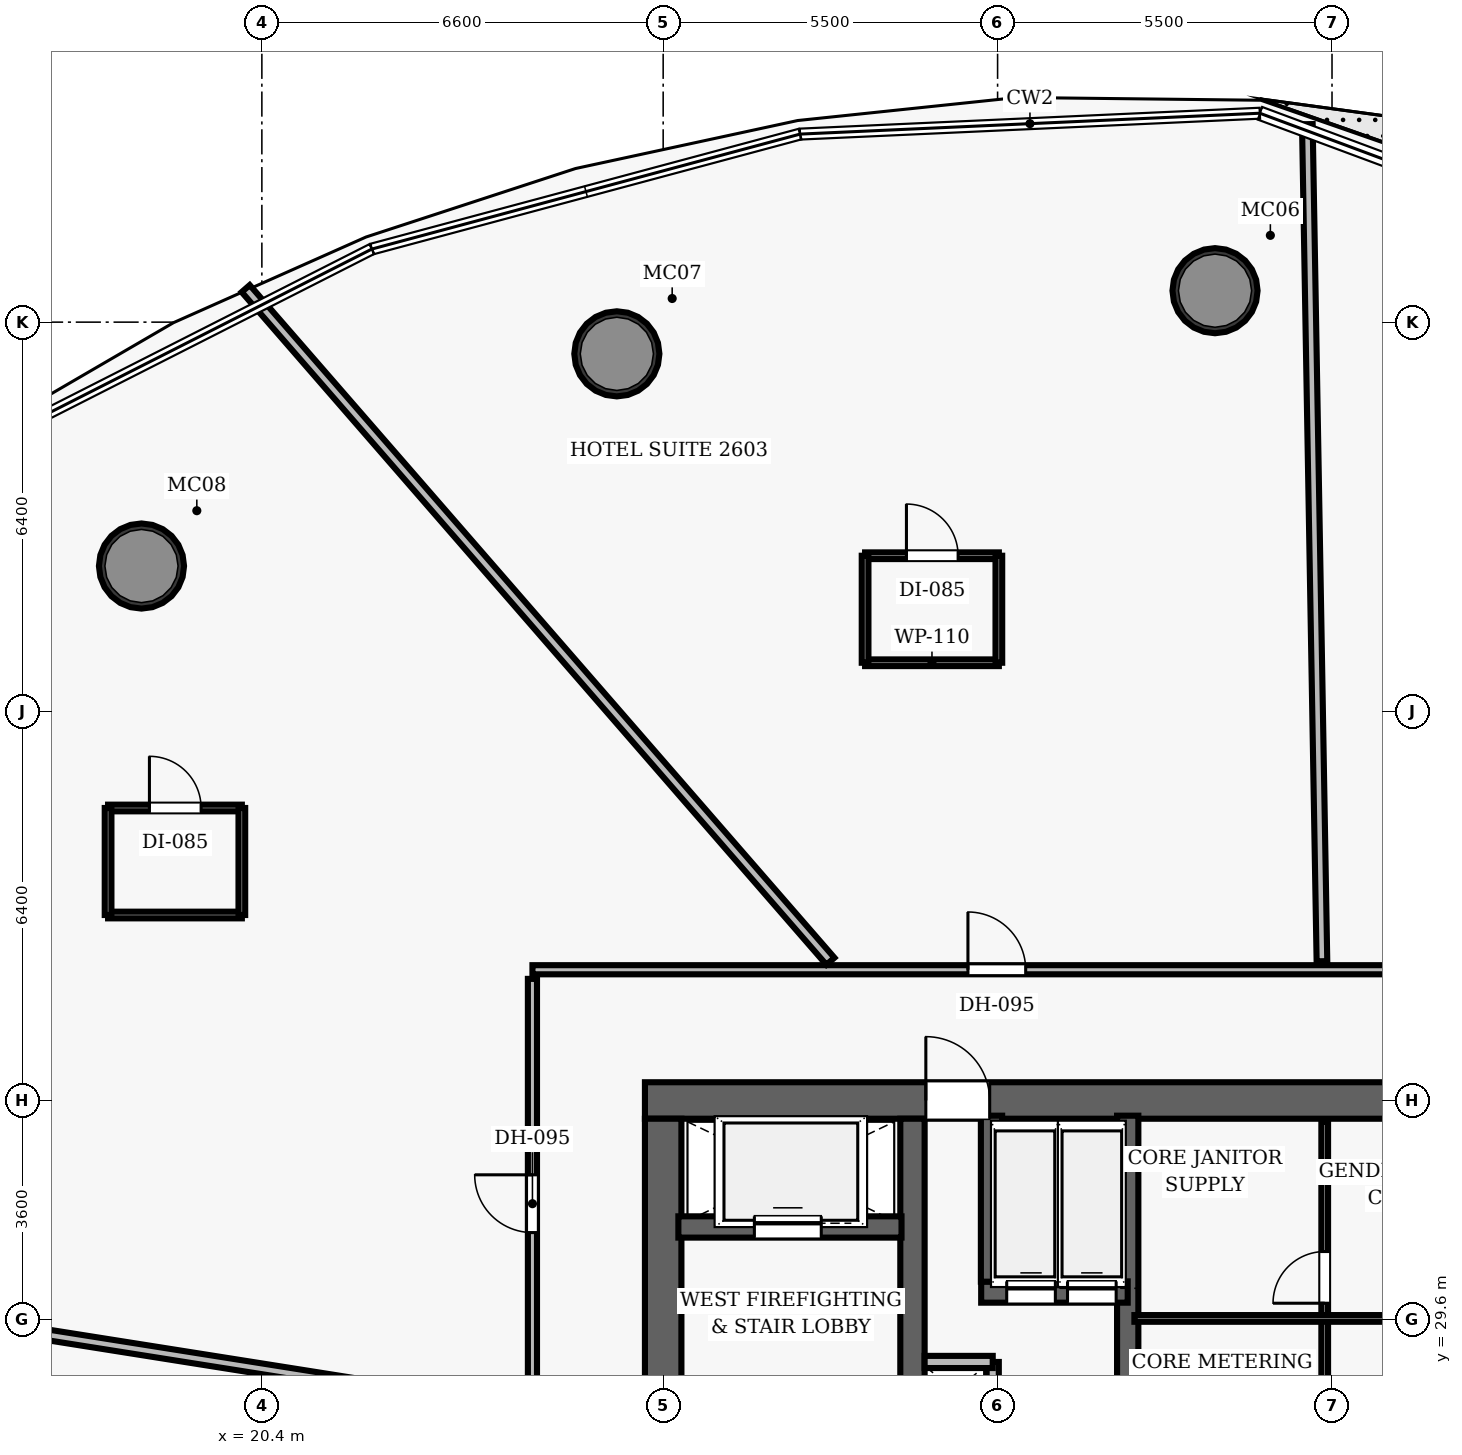
"""IFC4 building model, lengths in metres.
Left out: names, types, materials, properties, quantities, classifications, styles, units other than length and angle.
Written with IfcOpenShell. Run it as: python <this file> out.ifc"""

import sys

from ifc_helpers import new_model, si_unit, direction, frame, frame_2d, origin, origin_2d, place, context, subcontext, project, spatial, rectangle, hollow_circle, extrude, element, fill, save


model = new_model("IFC4")
c1 = context("Model", 3, precision=1e-05, world=origin(), true_north=direction((0.0, 1.0)))
c2 = subcontext(c1, "Body", "Model", "MODEL_VIEW")
j1 = project(units=[si_unit("LENGTHUNIT", "METRE"), si_unit("PLANEANGLEUNIT", "RADIAN")], contexts=[c1])
p1 = place(None, origin())
s1 = spatial("IfcSite", under=j1, at=p1, CompositionType="ELEMENT")
p2 = place(p1, origin())
s2 = spatial("IfcBuilding", under=s1, at=p2, CompositionType="ELEMENT")
p3 = place(p2, frame((0.0, 0.0, 109.8)))
s3 = spatial("IfcBuildingStorey", under=s2, at=p3, CompositionType="ELEMENT", Elevation=109.8)
p4 = place(p3, frame((26.7, 33.2, 0.0), z_axis=(0.0, 0.0, 1.0), x_axis=(1.0, 0.0, 0.0)))
e1 = element("IfcWall", 1, at=p4, inside=s3, PredefinedType="SHEAR", context=c2, shape_type="SweptSolid", body=[
    extrude(rectangle(XDim=22.6, YDim=0.6, at=frame_2d((11.3, 0.0))), origin(), (0.0, 0.0, 1.0), 3.5),
])
p5 = place(p4, frame((4.62, 0.0, 0.0)))
e2 = element("IfcOpeningElement", 2, at=p5, cuts=e1, PredefinedType="OPENING", context=c2, shape_type="SweptSolid", body=[
    extrude(rectangle(XDim=1.05, YDim=2.15, at=frame_2d((0.525, 1.075))), frame((0.0, 0.31, 0.0), z_axis=(0.0, -1.0, 0.0), x_axis=(1.0, 0.0, 0.0)), (0.0, 0.0, 1.0), 0.62),
])
p6 = place(p4, frame((14.52, 0.0, 0.0)))
e3 = element("IfcOpeningElement", 3, at=p6, cuts=e1, PredefinedType="OPENING", context=c2, shape_type="SweptSolid", body=[
    extrude(rectangle(XDim=1.05, YDim=2.15, at=frame_2d((0.525, 1.075))), frame((0.0, 0.31, 0.0), z_axis=(0.0, -1.0, 0.0), x_axis=(1.0, 0.0, 0.0)), (0.0, 0.0, 1.0), 0.62),
])
p7 = place(p3, frame((27.0, 19.1, 0.0), z_axis=(0.0, 0.0, 1.0), x_axis=(0.0, 1.0, 0.0)))
e4 = element("IfcWall", 4, at=p7, inside=s3, PredefinedType="SHEAR", context=c2, shape_type="SweptSolid", body=[
    extrude(rectangle(XDim=13.8, YDim=0.6, at=frame_2d((6.9, 0.0))), origin(), (0.0, 0.0, 1.0), 3.5),
])
p8 = place(p7, frame((8.2, 0.0, 0.0)))
e5 = element("IfcOpeningElement", 5, at=p8, cuts=e4, PredefinedType="OPENING", context=c2, shape_type="SweptSolid", body=[
    extrude(rectangle(XDim=1.05, YDim=2.15, at=frame_2d((0.525, 1.075))), frame((0.0, 0.31, 0.0), z_axis=(0.0, -1.0, 0.0), x_axis=(1.0, 0.0, 0.0)), (0.0, 0.0, 1.0), 0.62),
])
p9 = place(p3, frame((31.1, 19.1, 0.0), z_axis=(0.0, 0.0, 1.0), x_axis=(0.0, 1.0, 0.0)))
e6 = element("IfcWall", 6, at=p9, inside=s3, PredefinedType="SHEAR", context=c2, shape_type="SweptSolid", body=[
    extrude(rectangle(XDim=13.8, YDim=0.4, at=frame_2d((6.9, 0.0))), origin(), (0.0, 0.0, 1.0), 3.5),
])
for number, where, z_axis, x_axis in (
    (7, (36.076, 46.517, 0.0), (0.0, 0.0, 1.0), (1.0, 0.0, 0.0)),
    (8, (26.238, 45.479, 0.0), (0.0, 0.0, 1.0), (1.0, 0.0, 0.0)),
    (9, (18.42, 41.989, 0.0), (0.0, 0.0, 1.0), (1.0, 0.0, 0.0)),
):
    element("IfcColumn", number, at=place(p3, frame(where, z_axis=z_axis, x_axis=x_axis)), inside=s3, PredefinedType="COLUMN", context=c2, shape_type="SweptSolid", body=[
        extrude(hollow_circle(Radius=0.7, WallThickness=0.055, at=origin_2d()), origin(), (0.0, 0.0, 1.0), 3.5),
    ])
p10 = place(p3, frame((27.25, 31.12, 0.0), z_axis=(0.0, 0.0, 1.0), x_axis=(1.0, 0.0, 0.0)))
e10 = element("IfcWall", 10, at=p10, inside=s3, PredefinedType="SHEAR", context=c2, shape_type="SweptSolid", body=[
    extrude(rectangle(XDim=3.67, YDim=0.35, at=frame_2d((1.835, 0.0))), origin(), (0.0, 0.0, 1.0), 2.675),
])
p11 = place(p10, frame((1.25, 0.0, 0.0)))
e11 = element("IfcOpeningElement", 11, at=p11, cuts=e10, PredefinedType="OPENING", context=c2, shape_type="SweptSolid", body=[
    extrude(rectangle(XDim=1.1, YDim=2.15, at=frame_2d((0.55, 1.075))), frame((0.0, 0.185, 0.0), z_axis=(0.0, -1.0, 0.0), x_axis=(1.0, 0.0, 0.0)), (0.0, 0.0, 1.0), 0.37),
])
p12 = place(p3, frame((34.64, 26.69, 0.0), z_axis=(0.0, 0.0, 1.0), x_axis=(0.0, 1.0, 0.0)))
e12 = element("IfcWall", 12, at=p12, inside=s3, PredefinedType="SHEAR", context=c2, shape_type="SweptSolid", body=[
    extrude(rectangle(XDim=6.26, YDim=0.35, at=frame_2d((3.13, 0.0))), origin(), (0.0, 0.0, 1.0), 3.5),
])
p13 = place(p3, frame((32.23, 30.05, 0.0), z_axis=(0.0, 0.0, 1.0), x_axis=(1.0, 0.0, 0.0)))
e13 = element("IfcWall", 13, at=p13, inside=s3, PredefinedType="SHEAR", context=c2, shape_type="SweptSolid", body=[
    extrude(rectangle(XDim=2.41, YDim=0.35, at=frame_2d((1.205, 0.0))), origin(), (0.0, 0.0, 1.0), 2.675),
])
p14 = place(p13, frame((0.42, 0.0, 0.0)))
e14 = element("IfcOpeningElement", 14, at=p14, cuts=e13, PredefinedType="OPENING", context=c2, shape_type="SweptSolid", body=[
    extrude(rectangle(XDim=0.8, YDim=2.15, at=frame_2d((0.4, 1.075))), frame((0.0, 0.185, 0.0), z_axis=(0.0, -1.0, 0.0), x_axis=(1.0, 0.0, 0.0)), (0.0, 0.0, 1.0), 0.37),
])
p15 = place(p13, frame((1.42, 0.0, 0.0)))
e15 = element("IfcOpeningElement", 15, at=p15, cuts=e13, PredefinedType="OPENING", context=c2, shape_type="SweptSolid", body=[
    extrude(rectangle(XDim=0.8, YDim=2.15, at=frame_2d((0.4, 1.075))), frame((0.0, 0.185, 0.0), z_axis=(0.0, -1.0, 0.0), x_axis=(1.0, 0.0, 0.0)), (0.0, 0.0, 1.0), 0.37),
])
p16 = place(p3, frame((32.4, 30.22, 0.0), z_axis=(0.0, 0.0, 1.0), x_axis=(0.0, 1.0, 0.0)))
e16 = element("IfcWall", 16, at=p16, inside=s3, PredefinedType="SHEAR", context=c2, shape_type="SweptSolid", body=[
    extrude(rectangle(XDim=2.73, YDim=0.35, at=frame_2d((1.365, 0.0))), origin(), (0.0, 0.0, 1.0), 2.675),
])
p17 = place(p3, frame((32.42, 26.86, 0.0), z_axis=(0.0, 0.0, 1.0), x_axis=(0.0, 1.0, 0.0)))
e17 = element("IfcWall", 17, at=p17, inside=s3, PredefinedType="PARTITIONING", context=c2, shape_type="SweptSolid", body=[
    extrude(rectangle(XDim=2.04, YDim=0.2, at=frame_2d((1.02, 0.0))), origin(), (0.0, 0.0, 1.0), 2.675),
])
p18 = place(p17, frame((0.14, 0.0, 0.0)))
e18 = element("IfcOpeningElement", 18, at=p18, cuts=e17, PredefinedType="OPENING", context=c2, shape_type="SweptSolid", body=[
    extrude(rectangle(XDim=0.8, YDim=2.05, at=frame_2d((0.4, 1.025))), frame((0.0, 0.11, 0.0), z_axis=(0.0, -1.0, 0.0), x_axis=(1.0, 0.0, 0.0)), (0.0, 0.0, 1.0), 0.22),
])
p19 = place(p3, frame((31.3, 28.9, 0.0), z_axis=(0.0, 0.0, 1.0), x_axis=(1.0, 0.0, 0.0)))
e19 = element("IfcWall", 19, at=p19, inside=s3, PredefinedType="PARTITIONING", context=c2, shape_type="SweptSolid", body=[
    extrude(rectangle(XDim=1.12, YDim=0.2, at=frame_2d((0.56, 0.0))), origin(), (0.0, 0.0, 1.0), 2.675),
])
p20 = place(p3, frame((37.88, 23.05, 0.0), z_axis=(0.0, 0.0, 1.0), x_axis=(0.0, 1.0, 0.0)))
e20 = element("IfcWall", 20, at=p20, inside=s3, PredefinedType="PARTITIONING", context=c2, shape_type="SweptSolid", body=[
    extrude(rectangle(XDim=9.8, YDim=0.11, at=frame_2d((4.9, 0.0))), origin(), (0.0, 0.0, 1.0), 2.675),
])
p21 = place(p20, frame((0.25, 0.0, 0.0)))
e21 = element("IfcOpeningElement", 21, at=p21, cuts=e20, PredefinedType="OPENING", context=c2, shape_type="SweptSolid", body=[
    extrude(rectangle(XDim=0.85, YDim=2.1, at=frame_2d((0.425, 1.05))), frame((0.0, 0.065, 0.0), z_axis=(0.0, -1.0, 0.0), x_axis=(1.0, 0.0, 0.0)), (0.0, 0.0, 1.0), 0.13),
])
p22 = place(p20, frame((3.582, 0.0, 0.0)))
e22 = element("IfcOpeningElement", 22, at=p22, cuts=e20, PredefinedType="OPENING", context=c2, shape_type="SweptSolid", body=[
    extrude(rectangle(XDim=0.85, YDim=2.1, at=frame_2d((0.425, 1.05))), frame((0.0, 0.065, 0.0), z_axis=(0.0, -1.0, 0.0), x_axis=(1.0, 0.0, 0.0)), (0.0, 0.0, 1.0), 0.13),
])
p23 = place(p20, frame((6.816, 0.0, 0.0)))
e23 = element("IfcOpeningElement", 23, at=p23, cuts=e20, PredefinedType="OPENING", context=c2, shape_type="SweptSolid", body=[
    extrude(rectangle(XDim=0.85, YDim=2.1, at=frame_2d((0.425, 1.05))), frame((0.0, 0.065, 0.0), z_axis=(0.0, -1.0, 0.0), x_axis=(1.0, 0.0, 0.0)), (0.0, 0.0, 1.0), 0.13),
])
p24 = place(p3, frame((34.75, 29.616, 0.0), z_axis=(0.0, 0.0, 1.0), x_axis=(1.0, 0.0, 0.0)))
e24 = element("IfcWall", 24, at=p24, inside=s3, PredefinedType="PARTITIONING", context=c2, shape_type="SweptSolid", body=[
    extrude(rectangle(XDim=6.25, YDim=0.11, at=frame_2d((3.125, 0.0))), origin(), (0.0, 0.0, 1.0), 2.675),
])
p25 = place(p3, frame((24.85, 35.35, 0.0), z_axis=(0.0, 0.0, 1.0), x_axis=(1.0, 0.0, 0.0)))
e25 = element("IfcWall", 25, at=p25, inside=s3, PredefinedType="PARTITIONING", context=c2, shape_type="SweptSolid", body=[
    extrude(rectangle(XDim=26.0, YDim=0.15, at=frame_2d((13.0, 0.0))), origin(), (0.0, 0.0, 1.0), 2.675),
])
p26 = place(p25, frame((14.325, 0.0, 0.0)))
e26 = element("IfcOpeningElement", 26, at=p26, cuts=e25, PredefinedType="OPENING", context=c2, shape_type="SweptSolid", body=[
    extrude(rectangle(XDim=0.95, YDim=2.15, at=frame_2d((0.475, 1.075))), frame((0.0, 0.085, 0.0), z_axis=(0.0, -1.0, 0.0), x_axis=(1.0, 0.0, 0.0)), (0.0, 0.0, 1.0), 0.17),
])
p27 = place(p25, frame((7.162, 0.0, 0.0)))
e27 = element("IfcOpeningElement", 27, at=p27, cuts=e25, PredefinedType="OPENING", context=c2, shape_type="SweptSolid", body=[
    extrude(rectangle(XDim=0.95, YDim=2.15, at=frame_2d((0.475, 1.075))), frame((0.0, 0.085, 0.0), z_axis=(0.0, -1.0, 0.0), x_axis=(1.0, 0.0, 0.0)), (0.0, 0.0, 1.0), 0.17),
])
p28 = place(p3, frame((24.85, 27.08, 0.0), z_axis=(0.0, 0.0, 1.0), x_axis=(0.0, 1.0, 0.0)))
e28 = element("IfcWall", 28, at=p28, inside=s3, PredefinedType="PARTITIONING", context=c2, shape_type="SweptSolid", body=[
    extrude(rectangle(XDim=8.12, YDim=0.15, at=frame_2d((4.06, 0.0))), origin(), (0.0, 0.0, 1.0), 2.675),
])
p29 = place(p28, frame((3.948, 0.0, 0.0)))
e29 = element("IfcOpeningElement", 29, at=p29, cuts=e28, PredefinedType="OPENING", context=c2, shape_type="SweptSolid", body=[
    extrude(rectangle(XDim=0.95, YDim=2.15, at=frame_2d((0.475, 1.075))), frame((0.0, 0.085, 0.0), z_axis=(0.0, -1.0, 0.0), x_axis=(1.0, 0.0, 0.0)), (0.0, 0.0, 1.0), 0.17),
])
p30 = place(p3, frame((37.834, 35.49, 0.0), z_axis=(0.0, 0.0, 1.0), x_axis=(-0.017466829804, 0.999847443292, 0.0)))
e30 = element("IfcWall", 30, at=p30, inside=s3, PredefinedType="PARTITIONING", context=c2, shape_type="SweptSolid", body=[
    extrude(rectangle(XDim=13.768, YDim=0.175, at=frame_2d((6.884, 0.0))), origin(), (0.0, 0.0, 1.0), 2.675),
])
p31 = place(p3, frame((29.75, 35.49, 0.0), z_axis=(0.0, 0.0, 1.0), x_axis=(-0.656055403937, 0.754712731419, 0.0)))
e31 = element("IfcWall", 31, at=p31, inside=s3, PredefinedType="PARTITIONING", context=c2, shape_type="SweptSolid", body=[
    extrude(rectangle(XDim=14.657, YDim=0.175, at=frame_2d((7.329, 0.0))), origin(), (0.0, 0.0, 1.0), 2.675),
])
p32 = place(p3, frame((24.71, 28.105, 0.0), z_axis=(0.0, 0.0, 1.0), x_axis=(-0.987688276275, 0.156434871144, 0.0)))
e32 = element("IfcWall", 32, at=p32, inside=s3, PredefinedType="PARTITIONING", context=c2, shape_type="SweptSolid", body=[
    extrude(rectangle(XDim=16.59, YDim=0.175, at=frame_2d((8.295, 0.0))), origin(), (0.0, 0.0, 1.0), 2.675),
])
p33 = place(p3, frame((30.321, 40.399, 0.0), z_axis=(0.0, 0.0, 1.0), x_axis=(1.0, 0.0, 0.0)))
e33 = element("IfcWall", 33, at=p33, inside=s3, PredefinedType="PARTITIONING", context=c2, shape_type="SweptSolid", body=[
    extrude(rectangle(XDim=2.2, YDim=0.11, at=frame_2d((1.1, 0.0))), origin(), (0.0, 0.0, 1.0), 2.675),
])
p34 = place(p3, frame((30.321, 42.159, 0.0), z_axis=(0.0, 0.0, 1.0), x_axis=(1.0, 0.0, 0.0)))
e34 = element("IfcWall", 34, at=p34, inside=s3, PredefinedType="PARTITIONING", context=c2, shape_type="SweptSolid", body=[
    extrude(rectangle(XDim=2.2, YDim=0.11, at=frame_2d((1.1, 0.0))), origin(), (0.0, 0.0, 1.0), 2.675),
])
p35 = place(p34, frame((0.68, 0.0, 0.0)))
e35 = element("IfcOpeningElement", 35, at=p35, cuts=e34, PredefinedType="OPENING", context=c2, shape_type="SweptSolid", body=[
    extrude(rectangle(XDim=0.85, YDim=2.1, at=frame_2d((0.425, 1.05))), frame((0.0, 0.065, 0.0), z_axis=(0.0, -1.0, 0.0), x_axis=(1.0, 0.0, 0.0)), (0.0, 0.0, 1.0), 0.13),
])
for number, where, z_axis, x_axis in (
    (36, (30.321, 40.399, 0.0), (0.0, 0.0, 1.0), (0.0, 1.0, 0.0)),
    (37, (32.521, 40.399, 0.0), (0.0, 0.0, 1.0), (0.0, 1.0, 0.0)),
):
    element("IfcWall", number, at=place(p3, frame(where, z_axis=z_axis, x_axis=x_axis)), inside=s3, PredefinedType="PARTITIONING", context=c2, shape_type="SweptSolid", body=[
        extrude(rectangle(XDim=1.76, YDim=0.11, at=frame_2d((0.88, 0.0))), origin(), (0.0, 0.0, 1.0), 2.675),
    ])
p36 = place(p3, frame((17.871, 36.25, 0.0), z_axis=(0.0, 0.0, 1.0), x_axis=(1.0, 0.0, 0.0)))
e38 = element("IfcWall", 38, at=p36, inside=s3, PredefinedType="PARTITIONING", context=c2, shape_type="SweptSolid", body=[
    extrude(rectangle(XDim=2.2, YDim=0.11, at=frame_2d((1.1, 0.0))), origin(), (0.0, 0.0, 1.0), 2.675),
])
p37 = place(p3, frame((17.871, 38.01, 0.0), z_axis=(0.0, 0.0, 1.0), x_axis=(1.0, 0.0, 0.0)))
e39 = element("IfcWall", 39, at=p37, inside=s3, PredefinedType="PARTITIONING", context=c2, shape_type="SweptSolid", body=[
    extrude(rectangle(XDim=2.2, YDim=0.11, at=frame_2d((1.1, 0.0))), origin(), (0.0, 0.0, 1.0), 2.675),
])
p38 = place(p37, frame((0.68, 0.0, 0.0)))
e40 = element("IfcOpeningElement", 40, at=p38, cuts=e39, PredefinedType="OPENING", context=c2, shape_type="SweptSolid", body=[
    extrude(rectangle(XDim=0.85, YDim=2.1, at=frame_2d((0.425, 1.05))), frame((0.0, 0.065, 0.0), z_axis=(0.0, -1.0, 0.0), x_axis=(1.0, 0.0, 0.0)), (0.0, 0.0, 1.0), 0.13),
])
for number, where, z_axis, x_axis in (
    (41, (17.871, 36.25, 0.0), (0.0, 0.0, 1.0), (0.0, 1.0, 0.0)),
    (42, (20.071, 36.25, 0.0), (0.0, 0.0, 1.0), (0.0, 1.0, 0.0)),
):
    element("IfcWall", number, at=place(p3, frame(where, z_axis=z_axis, x_axis=x_axis)), inside=s3, PredefinedType="PARTITIONING", context=c2, shape_type="SweptSolid", body=[
        extrude(rectangle(XDim=1.76, YDim=0.11, at=frame_2d((0.88, 0.0))), origin(), (0.0, 0.0, 1.0), 2.675),
    ])
p39 = place(p5, origin())
e43 = element("IfcDoor", 43, at=p39, inside=s3, OperationType="SINGLE_SWING_LEFT", PredefinedType="DOOR", context=c2, shape_type="SweptSolid", body=[
    extrude(rectangle(XDim=1.05, YDim=2.15, at=frame_2d((0.525, 1.075))), frame((0.0, 0.025, 0.0), z_axis=(0.0, -1.0, 0.0), x_axis=(1.0, 0.0, 0.0)), (0.0, 0.0, 1.0), 0.05),
])
fill(e2, e43)
p40 = place(p23, origin())
e44 = element("IfcDoor", 44, at=p40, inside=s3, OperationType="SINGLE_SWING_LEFT", PredefinedType="DOOR", context=c2, shape_type="SweptSolid", body=[
    extrude(rectangle(XDim=0.85, YDim=2.1, at=frame_2d((0.425, 1.05))), frame((0.0, 0.025, 0.0), z_axis=(0.0, -1.0, 0.0), x_axis=(1.0, 0.0, 0.0)), (0.0, 0.0, 1.0), 0.05),
])
fill(e23, e44)
p41 = place(p27, origin())
e45 = element("IfcDoor", 45, at=p41, inside=s3, OperationType="SINGLE_SWING_LEFT", PredefinedType="DOOR", context=c2, shape_type="SweptSolid", body=[
    extrude(rectangle(XDim=0.95, YDim=2.15, at=frame_2d((0.475, 1.075))), frame((0.0, 0.025, 0.0), z_axis=(0.0, -1.0, 0.0), x_axis=(1.0, 0.0, 0.0)), (0.0, 0.0, 1.0), 0.05),
])
fill(e27, e45)
p42 = place(p35, origin())
e46 = element("IfcDoor", 46, at=p42, inside=s3, OperationType="SINGLE_SWING_LEFT", PredefinedType="DOOR", context=c2, shape_type="SweptSolid", body=[
    extrude(rectangle(XDim=0.85, YDim=2.1, at=frame_2d((0.425, 1.05))), frame((0.0, 0.025, 0.0), z_axis=(0.0, -1.0, 0.0), x_axis=(1.0, 0.0, 0.0)), (0.0, 0.0, 1.0), 0.05),
])
fill(e35, e46)
p43 = place(p29, origin())
e47 = element("IfcDoor", 47, at=p43, inside=s3, OperationType="SINGLE_SWING_RIGHT", PredefinedType="DOOR", context=c2, shape_type="SweptSolid", body=[
    extrude(rectangle(XDim=0.95, YDim=2.15, at=frame_2d((0.475, 1.075))), frame((0.0, 0.025, 0.0), z_axis=(0.0, -1.0, 0.0), x_axis=(1.0, 0.0, 0.0)), (0.0, 0.0, 1.0), 0.05),
])
fill(e29, e47)
p44 = place(p38, origin())
e48 = element("IfcDoor", 48, at=p44, inside=s3, OperationType="SINGLE_SWING_LEFT", PredefinedType="DOOR", context=c2, shape_type="SweptSolid", body=[
    extrude(rectangle(XDim=0.85, YDim=2.1, at=frame_2d((0.425, 1.05))), frame((0.0, 0.025, 0.0), z_axis=(0.0, -1.0, 0.0), x_axis=(1.0, 0.0, 0.0)), (0.0, 0.0, 1.0), 0.05),
])
fill(e40, e48)
p45 = place(p11, origin())
e49 = element("IfcDoor", 49, at=p45, inside=s3, OperationType="SLIDING_TO_LEFT", PredefinedType="DOOR", context=c2, shape_type="SweptSolid", body=[
    extrude(rectangle(XDim=1.1, YDim=2.15, at=frame_2d((0.55, 1.075))), frame((0.0, 0.025, 0.0), z_axis=(0.0, -1.0, 0.0), x_axis=(1.0, 0.0, 0.0)), (0.0, 0.0, 1.0), 0.05),
])
fill(e11, e49)
p46 = place(p14, origin())
e50 = element("IfcDoor", 50, at=p46, inside=s3, OperationType="SLIDING_TO_LEFT", PredefinedType="DOOR", context=c2, shape_type="SweptSolid", body=[
    extrude(rectangle(XDim=0.8, YDim=2.15, at=frame_2d((0.4, 1.075))), frame((0.0, 0.025, 0.0), z_axis=(0.0, -1.0, 0.0), x_axis=(1.0, 0.0, 0.0)), (0.0, 0.0, 1.0), 0.05),
])
fill(e14, e50)
p47 = place(p15, origin())
e51 = element("IfcDoor", 51, at=p47, inside=s3, OperationType="SLIDING_TO_LEFT", PredefinedType="DOOR", context=c2, shape_type="SweptSolid", body=[
    extrude(rectangle(XDim=0.8, YDim=2.15, at=frame_2d((0.4, 1.075))), frame((0.0, 0.025, 0.0), z_axis=(0.0, -1.0, 0.0), x_axis=(1.0, 0.0, 0.0)), (0.0, 0.0, 1.0), 0.05),
])
fill(e15, e51)
save(model, sys.argv[1])
